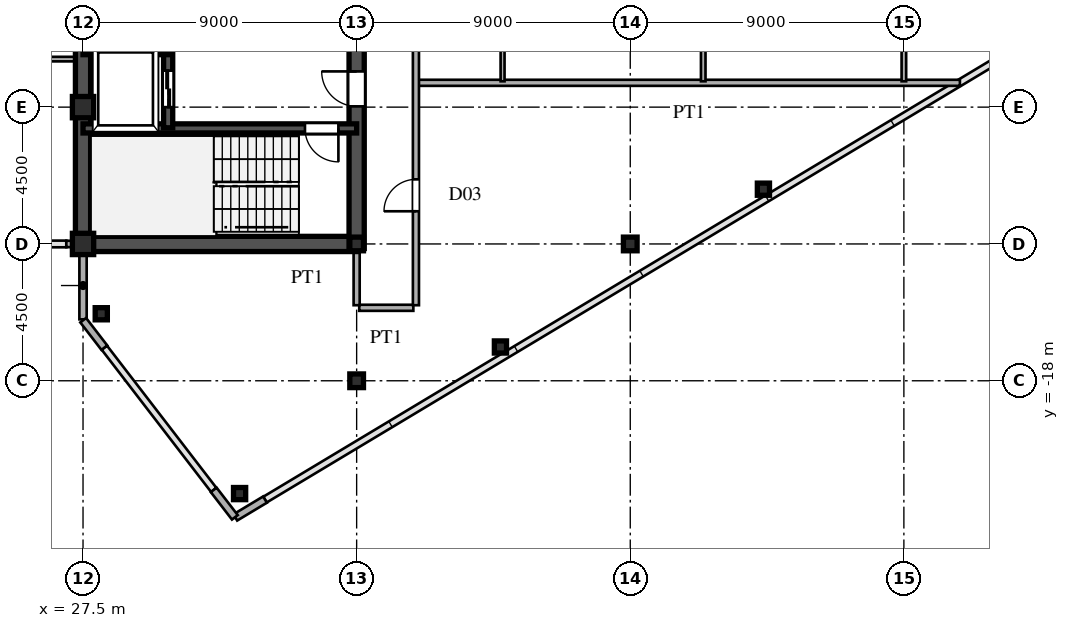
"""IFC4 building model, lengths in metres.
Left out: names, types, materials, properties, quantities, classifications, styles, units other than length and angle.
Written with IfcOpenShell. Run it as: python <this file> out.ifc"""

import sys

from ifc_helpers import new_model, si_unit, direction, frame, frame_2d, origin, origin_2d, place, context, subcontext, project, spatial, rectangle, hollow_rectangle, i_section, extrude, source, transform, mapped, element, fill, save


model = new_model("IFC4")
c1 = context("Model", 3, precision=1e-05, world=origin(), true_north=direction((0.0, 1.0)))
c2 = subcontext(c1, "Body", "Model", "MODEL_VIEW")
j1 = project(units=[si_unit("LENGTHUNIT", "METRE"), si_unit("PLANEANGLEUNIT", "RADIAN")], contexts=[c1])
p1 = place(None, origin())
s1 = spatial("IfcSite", under=j1, at=p1, CompositionType="ELEMENT")
p2 = place(p1, origin())
s2 = spatial("IfcBuilding", under=s1, at=p2, CompositionType="ELEMENT")
p3 = place(p2, frame((0.0, 0.0, 254.4)))
s3 = spatial("IfcBuildingStorey", under=s2, at=p3, CompositionType="ELEMENT", Elevation=254.4)
m1 = source(origin(), c2, "Body", "SweptSolid", [
    extrude(hollow_rectangle(XDim=0.7, YDim=0.7, WallThickness=0.03, at=origin_2d()), origin(), (0.0, 0.0, 1.0), 3.75),
])
for number, where, z_axis, x_axis in (
    (1, (27.5, -13.5, 0.0), (0.0, 0.0, 1.0), (1.0, 0.0, 0.0)),
    (2, (27.5, -9.0, 0.0), (0.0, 0.0, 1.0), (1.0, 0.0, 0.0)),
):
    element("IfcColumn", number, at=place(p3, frame(where, z_axis=z_axis, x_axis=x_axis)), inside=s3, PredefinedType="COLUMN", context=c2, shape_type="MappedRepresentation", body=[
        mapped(m1, transform((0.0, 0.0, 0.0), scale=1.0)),
    ])
m2 = source(origin(), c2, "Body", "SweptSolid", [
    extrude(i_section(OverallWidth=0.45, OverallDepth=0.45, WebThickness=0.016, FlangeThickness=0.025, at=origin_2d()), origin(), (0.0, 0.0, 1.0), 3.75),
])
for number, where, z_axis, x_axis in (
    (3, (36.5, -18.0, 0.0), (0.0, 0.0, 1.0), (1.0, 0.0, 0.0)),
    (4, (36.5, -13.5, 0.0), (0.0, 0.0, 1.0), (1.0, 0.0, 0.0)),
    (5, (45.5, -13.5, 0.0), (0.0, 0.0, 1.0), (1.0, 0.0, 0.0)),
):
    element("IfcColumn", number, at=place(p3, frame(where, z_axis=z_axis, x_axis=x_axis)), inside=s3, PredefinedType="COLUMN", context=c2, shape_type="MappedRepresentation", body=[
        mapped(m2, transform((0.0, 0.0, 0.0), scale=1.0)),
    ])
m3 = source(origin(), c2, "Body", "SweptSolid", [
    extrude(hollow_rectangle(XDim=0.4, YDim=0.4, WallThickness=0.016, at=origin_2d()), origin(), (0.0, 0.0, 1.0), 3.75),
])
for number, where, z_axis, x_axis in (
    (6, (32.65, -21.71, 0.0), (0.0, 0.0, 1.0), (1.0, 0.0, 0.0)),
    (7, (28.1, -15.796, 0.0), (0.0, 0.0, 1.0), (1.0, 0.0, 0.0)),
    (8, (41.23, -16.889, 0.0), (0.0, 0.0, 1.0), (1.0, 0.0, 0.0)),
    (9, (49.88, -11.699, 0.0), (0.0, 0.0, 1.0), (1.0, 0.0, 0.0)),
):
    element("IfcColumn", number, at=place(p3, frame(where, z_axis=z_axis, x_axis=x_axis)), inside=s3, PredefinedType="COLUMN", context=c2, shape_type="MappedRepresentation", body=[
        mapped(m3, transform((0.0, 0.0, 0.0), scale=1.0)),
    ])
p4 = place(p3, frame((32.509, -22.495, 0.0), z_axis=(0.0, 0.0, 1.0), x_axis=(0.85743623509, 0.514590228002, 0.0)))
e10 = element("IfcWall", 10, at=p4, inside=s3, PredefinedType="SOLIDWALL", context=c2, shape_type="SweptSolid", body=[
    extrude(rectangle(XDim=1.14, YDim=0.24, at=frame_2d((0.57, 0.0))), origin(), (0.0, 0.0, 1.0), 3.53),
])
p5 = place(p3, frame((27.5, -15.98, 0.0), z_axis=(0.0, 0.0, 1.0), x_axis=(0.0, 1.0, 0.0)))
e11 = element("IfcWall", 11, at=p5, inside=s3, PredefinedType="SOLIDWALL", context=c2, shape_type="SweptSolid", body=[
    extrude(rectangle(XDim=1.605, YDim=0.24, at=frame_2d((0.803, 0.0))), origin(), (0.0, 0.0, 1.0), 3.53),
])
p6 = place(p3, frame((27.5, -14.375, 0.0), z_axis=(0.0, 0.0, 1.0), x_axis=(0.0, 1.0, 0.0)))
e12 = element("IfcWall", 12, at=p6, inside=s3, PredefinedType="SOLIDWALL", context=c2, shape_type="SweptSolid", body=[
    extrude(rectangle(XDim=0.62, YDim=0.24, at=frame_2d((0.31, 0.0))), origin(), (0.0, 0.0, 1.0), 3.03),
])
for number, where, z_axis, x_axis in (
    (13, (27.506, -16.008, 0.0), (0.0, 0.0, 1.0), (0.61, -0.793, 0.0)),
    (14, (31.799, -21.588, 0.0), (0.0, 0.0, 1.0), (0.61, -0.793, 0.0)),
):
    element("IfcWall", number, at=place(p3, frame(where, z_axis=z_axis, x_axis=x_axis)), inside=s3, PredefinedType="SOLIDWALL", context=c2, shape_type="SweptSolid", body=[
        extrude(rectangle(XDim=1.14, YDim=0.24, at=frame_2d((0.57, 0.0))), origin(), (0.0, 0.0, 1.0), 3.53),
    ])
p7 = place(p3, frame((26.95, -13.5, 0.0), z_axis=(0.0, 0.0, 1.0), x_axis=(1.0, 0.0, 0.0)))
e15 = element("IfcWall", 15, at=p7, inside=s3, PredefinedType="SOLIDWALL", context=c2, shape_type="SweptSolid", body=[
    extrude(rectangle(XDim=0.54, YDim=0.21, at=frame_2d((0.27, 0.0))), origin(), (0.0, 0.0, 1.0), 3.03),
])
p8 = place(p3, frame((27.5, -13.5, 0.0), z_axis=(0.0, 0.0, 1.0), x_axis=(0.0, 1.0, 0.0)))
e16 = element("IfcWall", 16, at=p8, inside=s3, PredefinedType="SHEAR", context=c2, shape_type="SweptSolid", body=[
    extrude(rectangle(XDim=12.2, YDim=0.5, at=frame_2d((6.1, 0.0))), origin(), (0.0, 0.0, 1.0), 3.53),
])
p9 = place(p3, frame((27.5, -13.5, 0.0), z_axis=(0.0, 0.0, 1.0), x_axis=(1.0, 0.0, 0.0)))
e17 = element("IfcWall", 17, at=p9, inside=s3, PredefinedType="SHEAR", context=c2, shape_type="SweptSolid", body=[
    extrude(rectangle(XDim=9.0, YDim=0.5, at=frame_2d((4.5, 0.0))), origin(), (0.0, 0.0, 1.0), 3.53),
])
p10 = place(p3, frame((36.5, -13.65, 0.0), z_axis=(0.0, 0.0, 1.0), x_axis=(0.0, 1.0, 0.0)))
e18 = element("IfcWall", 18, at=p10, inside=s3, PredefinedType="SHEAR", context=c2, shape_type="SweptSolid", body=[
    extrude(rectangle(XDim=7.15, YDim=0.5, at=frame_2d((3.575, 0.0))), origin(), (0.0, 0.0, 1.0), 3.53),
])
p11 = place(p10, frame((4.675, 0.0, 0.0)))
e19 = element("IfcOpeningElement", 19, at=p11, cuts=e18, PredefinedType="OPENING", context=c2, shape_type="SweptSolid", body=[
    extrude(rectangle(XDim=1.15, YDim=2.2, at=frame_2d((0.575, 1.1))), frame((0.0, 0.26, 0.0), z_axis=(0.0, -1.0, 0.0), x_axis=(1.0, 0.0, 0.0)), (0.0, 0.0, 1.0), 0.52),
])
p12 = place(p3, frame((27.5, -9.7, 0.0), z_axis=(0.0, 0.0, 1.0), x_axis=(1.0, 0.0, 0.0)))
e20 = element("IfcWall", 20, at=p12, inside=s3, PredefinedType="SHEAR", context=c2, shape_type="SweptSolid", body=[
    extrude(rectangle(XDim=9.0, YDim=0.3, at=frame_2d((4.5, 0.0))), origin(), (0.0, 0.0, 1.0), 3.53),
])
p13 = place(p12, frame((7.3, 0.0, 0.0)))
e21 = element("IfcOpeningElement", 21, at=p13, cuts=e20, PredefinedType="OPENING", context=c2, shape_type="SweptSolid", body=[
    extrude(rectangle(XDim=1.1, YDim=2.2, at=frame_2d((0.55, 1.1))), frame((0.0, 0.16, 0.0), z_axis=(0.0, -1.0, 0.0), x_axis=(1.0, 0.0, 0.0)), (0.0, 0.0, 1.0), 0.32),
])
p14 = place(p3, frame((27.5, -7.15, 0.0), z_axis=(0.0, 0.0, 1.0), x_axis=(1.0, 0.0, 0.0)))
e22 = element("IfcWall", 22, at=p14, inside=s3, PredefinedType="SHEAR", context=c2, shape_type="SweptSolid", body=[
    extrude(rectangle(XDim=2.8, YDim=0.25, at=frame_2d((1.4, 0.0))), origin(), (0.0, 0.0, 1.0), 3.53),
])
p15 = place(p3, frame((30.3, -9.68, 0.0), z_axis=(0.0, 0.0, 1.0), x_axis=(0.0, 1.0, 0.0)))
e23 = element("IfcWall", 23, at=p15, inside=s3, PredefinedType="SHEAR", context=c2, shape_type="SweptSolid", body=[
    extrude(rectangle(XDim=2.56, YDim=0.3, at=frame_2d((1.28, 0.0))), origin(), (0.0, 0.0, 1.0), 3.53),
])
p16 = place(p15, frame((0.68, 0.0, 0.0)))
e24 = element("IfcOpeningElement", 24, at=p16, cuts=e23, PredefinedType="OPENING", context=c2, shape_type="SweptSolid", body=[
    extrude(rectangle(XDim=1.2, YDim=2.25, at=frame_2d((0.6, 1.125))), frame((0.0, 0.16, 0.0), z_axis=(0.0, -1.0, 0.0), x_axis=(1.0, 0.0, 0.0)), (0.0, 0.0, 1.0), 0.32),
])
p17 = place(p3, frame((36.585, -15.6, 0.0), z_axis=(0.0, 0.0, 1.0), x_axis=(1.0, 0.0, 0.0)))
e25 = element("IfcWall", 25, at=p17, inside=s3, PredefinedType="PARTITIONING", context=c2, shape_type="SweptSolid", body=[
    extrude(rectangle(XDim=1.78, YDim=0.2, at=frame_2d((0.89, 0.0))), origin(), (0.0, 0.0, 1.0), 3.53),
])
p18 = place(p3, frame((38.53, -8.2, 0.0), z_axis=(0.0, 0.0, 1.0), x_axis=(1.0, 0.0, 0.0)))
e26 = element("IfcWall", 26, at=p18, inside=s3, PredefinedType="PARTITIONING", context=c2, shape_type="SweptSolid", body=[
    extrude(rectangle(XDim=17.813, YDim=0.2, at=frame_2d((8.906, 0.0))), origin(), (0.0, 0.0, 1.0), 3.53),
])
p19 = place(p3, frame((7.085, -7.42, 0.0), z_axis=(0.0, 0.0, 1.0), x_axis=(1.0, 0.0, 0.0)))
e27 = element("IfcWall", 27, at=p19, inside=s3, PredefinedType="PARTITIONING", context=c2, shape_type="SweptSolid", body=[
    extrude(rectangle(XDim=20.16, YDim=0.15, at=frame_2d((10.08, 0.0))), origin(), (0.0, 0.0, 1.0), 3.53),
])
p20 = place(p19, frame((3.44, 0.0, 0.0)))
e28 = element("IfcOpeningElement", 28, at=p20, cuts=e27, PredefinedType="OPENING", context=c2, shape_type="SweptSolid", body=[
    extrude(rectangle(XDim=0.95, YDim=2.15, at=frame_2d((0.475, 1.075))), frame((0.0, 0.085, 0.0), z_axis=(0.0, -1.0, 0.0), x_axis=(1.0, 0.0, 0.0)), (0.0, 0.0, 1.0), 0.17),
])
p21 = place(p19, frame((10.69, 0.0, 0.0)))
e29 = element("IfcOpeningElement", 29, at=p21, cuts=e27, PredefinedType="OPENING", context=c2, shape_type="SweptSolid", body=[
    extrude(rectangle(XDim=0.95, YDim=2.15, at=frame_2d((0.475, 1.075))), frame((0.0, 0.085, 0.0), z_axis=(0.0, -1.0, 0.0), x_axis=(1.0, 0.0, 0.0)), (0.0, 0.0, 1.0), 0.17),
])
p22 = place(p19, frame((16.94, 0.0, 0.0)))
e30 = element("IfcOpeningElement", 30, at=p22, cuts=e27, PredefinedType="OPENING", context=c2, shape_type="SweptSolid", body=[
    extrude(rectangle(XDim=0.95, YDim=2.15, at=frame_2d((0.475, 1.075))), frame((0.0, 0.085, 0.0), z_axis=(0.0, -1.0, 0.0), x_axis=(1.0, 0.0, 0.0)), (0.0, 0.0, 1.0), 0.17),
])
p23 = place(p3, frame((36.5, -15.515, 0.0), z_axis=(0.0, 0.0, 1.0), x_axis=(0.0, 1.0, 0.0)))
e31 = element("IfcWall", 31, at=p23, inside=s3, PredefinedType="PARTITIONING", context=c2, shape_type="SweptSolid", body=[
    extrude(rectangle(XDim=1.76, YDim=0.2, at=frame_2d((0.88, 0.0))), origin(), (0.0, 0.0, 1.0), 2.93),
])
p24 = place(p3, frame((38.45, -15.515, 0.0), z_axis=(0.0, 0.0, 1.0), x_axis=(0.0, 1.0, 0.0)))
e32 = element("IfcWall", 32, at=p24, inside=s3, PredefinedType="PARTITIONING", context=c2, shape_type="SweptSolid", body=[
    extrude(rectangle(XDim=31.03, YDim=0.2, at=frame_2d((15.515, 0.0))), origin(), (0.0, 0.0, 1.0), 3.53),
])
p25 = place(p24, frame((3.09, 0.0, 0.0)))
e33 = element("IfcOpeningElement", 33, at=p25, cuts=e32, PredefinedType="OPENING", context=c2, shape_type="SweptSolid", body=[
    extrude(rectangle(XDim=1.05, YDim=2.25, at=frame_2d((0.525, 1.125))), frame((0.0, 0.11, 0.0), z_axis=(0.0, -1.0, 0.0), x_axis=(1.0, 0.0, 0.0)), (0.0, 0.0, 1.0), 0.22),
])
p26 = place(p24, frame((13.095, 0.0, 0.0)))
e34 = element("IfcOpeningElement", 34, at=p26, cuts=e32, PredefinedType="OPENING", context=c2, shape_type="SweptSolid", body=[
    extrude(rectangle(XDim=1.05, YDim=2.25, at=frame_2d((0.525, 1.125))), frame((0.0, 0.11, 0.0), z_axis=(0.0, -1.0, 0.0), x_axis=(1.0, 0.0, 0.0)), (0.0, 0.0, 1.0), 0.22),
])
p27 = place(p24, frame((25.19, 0.0, 0.0)))
e35 = element("IfcOpeningElement", 35, at=p27, cuts=e32, PredefinedType="OPENING", context=c2, shape_type="SweptSolid", body=[
    extrude(rectangle(XDim=1.05, YDim=2.25, at=frame_2d((0.525, 1.125))), frame((0.0, 0.11, 0.0), z_axis=(0.0, -1.0, 0.0), x_axis=(1.0, 0.0, 0.0)), (0.0, 0.0, 1.0), 0.22),
])
p28 = place(p3, frame((41.3, -8.15, 0.0), z_axis=(0.0, 0.0, 1.0), x_axis=(0.0, 1.0, 0.0)))
e36 = element("IfcWall", 36, at=p28, inside=s3, PredefinedType="PARTITIONING", context=c2, shape_type="SweptSolid", body=[
    extrude(rectangle(XDim=3.408, YDim=0.13, at=frame_2d((1.704, 0.0))), origin(), (0.0, 0.0, 1.0), 3.53),
])
p29 = place(p3, frame((47.9, -8.15, 0.0), z_axis=(0.0, 0.0, 1.0), x_axis=(0.0, 1.0, 0.0)))
e37 = element("IfcWall", 37, at=p29, inside=s3, PredefinedType="PARTITIONING", context=c2, shape_type="SweptSolid", body=[
    extrude(rectangle(XDim=12.9, YDim=0.15, at=frame_2d((6.45, 0.0))), origin(), (0.0, 0.0, 1.0), 3.53),
])
p30 = place(p29, frame((5.975, 0.0, 0.0)))
e38 = element("IfcOpeningElement", 38, at=p30, cuts=e37, PredefinedType="OPENING", context=c2, shape_type="SweptSolid", body=[
    extrude(rectangle(XDim=0.95, YDim=2.15, at=frame_2d((0.475, 1.075))), frame((0.0, 0.085, 0.0), z_axis=(0.0, -1.0, 0.0), x_axis=(1.0, 0.0, 0.0)), (0.0, 0.0, 1.0), 0.17),
])
p31 = place(p29, frame((1.642, 0.0, 0.0)))
e39 = element("IfcOpeningElement", 39, at=p31, cuts=e37, PredefinedType="OPENING", context=c2, shape_type="SweptSolid", body=[
    extrude(rectangle(XDim=0.95, YDim=2.15, at=frame_2d((0.475, 1.075))), frame((0.0, 0.085, 0.0), z_axis=(0.0, -1.0, 0.0), x_axis=(1.0, 0.0, 0.0)), (0.0, 0.0, 1.0), 0.17),
])
p32 = place(p3, frame((54.5, -8.15, 0.0), z_axis=(0.0, 0.0, 1.0), x_axis=(0.0, 1.0, 0.0)))
e40 = element("IfcWall", 40, at=p32, inside=s3, PredefinedType="PARTITIONING", context=c2, shape_type="SweptSolid", body=[
    extrude(rectangle(XDim=12.9, YDim=0.15, at=frame_2d((6.45, 0.0))), origin(), (0.0, 0.0, 1.0), 2.93),
])
p33 = place(p32, frame((5.975, 0.0, 0.0)))
e41 = element("IfcOpeningElement", 41, at=p33, cuts=e40, PredefinedType="OPENING", context=c2, shape_type="SweptSolid", body=[
    extrude(rectangle(XDim=0.95, YDim=2.15, at=frame_2d((0.475, 1.075))), frame((0.0, 0.085, 0.0), z_axis=(0.0, -1.0, 0.0), x_axis=(1.0, 0.0, 0.0)), (0.0, 0.0, 1.0), 0.17),
])
p34 = place(p32, frame((1.642, 0.0, 0.0)))
e42 = element("IfcOpeningElement", 42, at=p34, cuts=e40, PredefinedType="OPENING", context=c2, shape_type="SweptSolid", body=[
    extrude(rectangle(XDim=0.95, YDim=2.15, at=frame_2d((0.475, 1.075))), frame((0.0, 0.085, 0.0), z_axis=(0.0, -1.0, 0.0), x_axis=(1.0, 0.0, 0.0)), (0.0, 0.0, 1.0), 0.17),
])
p35 = place(p32, frame((10.308, 0.0, 0.0)))
e43 = element("IfcOpeningElement", 43, at=p35, cuts=e40, PredefinedType="OPENING", context=c2, shape_type="SweptSolid", body=[
    extrude(rectangle(XDim=0.95, YDim=2.15, at=frame_2d((0.475, 1.075))), frame((0.0, 0.085, 0.0), z_axis=(0.0, -1.0, 0.0), x_axis=(1.0, 0.0, 0.0)), (0.0, 0.0, 1.0), 0.17),
])
m4 = source(origin(), c2, "Body", "SweptSolid", [
    extrude(rectangle(XDim=1.15, YDim=2.2, at=frame_2d((0.575, 1.1))), frame((0.0, 0.025, 0.0), z_axis=(0.0, -1.0, 0.0), x_axis=(1.0, 0.0, 0.0)), (0.0, 0.0, 1.0), 0.05),
])
p36 = place(p11, origin())
e44 = element("IfcDoor", 44, at=p36, inside=s3, OperationType="SINGLE_SWING_RIGHT", PredefinedType="DOOR", context=c2, shape_type="MappedRepresentation", body=[
    mapped(m4, transform((0.0, 0.0, 0.0), scale=1.0)),
])
fill(e19, e44)
m5 = source(origin(), c2, "Body", "SweptSolid", [
    extrude(rectangle(XDim=1.1, YDim=2.2, at=frame_2d((0.55, 1.1))), frame((0.0, 0.025, 0.0), z_axis=(0.0, -1.0, 0.0), x_axis=(1.0, 0.0, 0.0)), (0.0, 0.0, 1.0), 0.05),
])
p37 = place(p13, frame((1.1, 0.0, 0.0), z_axis=(0.0, 0.0, 1.0), x_axis=(-1.0, 0.0, 0.0)))
e45 = element("IfcDoor", 45, at=p37, inside=s3, OperationType="SINGLE_SWING_RIGHT", PredefinedType="DOOR", context=c2, shape_type="MappedRepresentation", body=[
    mapped(m5, transform((0.0, 0.0, 0.0), scale=1.0)),
])
fill(e21, e45)
m6 = source(origin(), c2, "Body", "SweptSolid", [
    extrude(rectangle(XDim=1.2, YDim=2.25, at=frame_2d((0.6, 1.125))), frame((0.0, 0.025, 0.0), z_axis=(0.0, -1.0, 0.0), x_axis=(1.0, 0.0, 0.0)), (0.0, 0.0, 1.0), 0.05),
])
p38 = place(p16, origin())
e46 = element("IfcDoor", 46, at=p38, inside=s3, OperationType="DOUBLE_DOOR_SLIDING", PredefinedType="DOOR", context=c2, shape_type="MappedRepresentation", body=[
    mapped(m6, transform((0.0, 0.0, 0.0), scale=1.0)),
])
fill(e24, e46)
m7 = source(origin(), c2, "Body", "SweptSolid", [
    extrude(rectangle(XDim=1.05, YDim=2.25, at=frame_2d((0.525, 1.125))), frame((0.0, 0.025, 0.0), z_axis=(0.0, -1.0, 0.0), x_axis=(1.0, 0.0, 0.0)), (0.0, 0.0, 1.0), 0.05),
])
p39 = place(p25, origin())
e47 = element("IfcDoor", 47, at=p39, inside=s3, OperationType="SINGLE_SWING_LEFT", PredefinedType="DOOR", context=c2, shape_type="MappedRepresentation", body=[
    mapped(m7, transform((0.0, 0.0, 0.0), scale=1.0)),
])
fill(e33, e47)
save(model, sys.argv[1])
